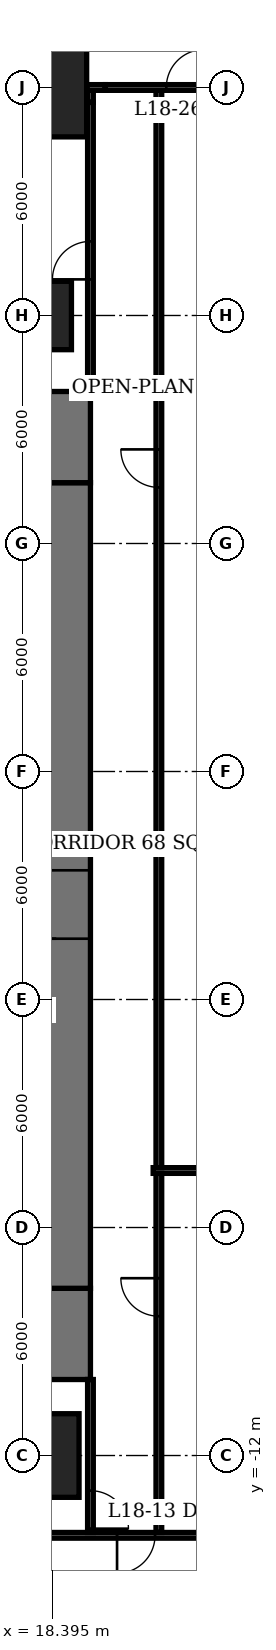
"""IFC4 building model, lengths in metres.
Left out: names, types, materials, properties, quantities, classifications, styles, units other than length and angle.
Written with IfcOpenShell. Run it as: python <this file> out.ifc"""

import sys

from ifc_helpers import new_model, si_unit, direction, frame, frame_2d, origin, origin_2d, place, context, subcontext, project, spatial, rectangle, extrude, element, fill, save


model = new_model("IFC4")
c1 = context("Model", 3, precision=1e-05, world=origin(), true_north=direction((0.0, 1.0)))
c2 = subcontext(c1, "Body", "Model", "MODEL_VIEW")
j1 = project(units=[si_unit("LENGTHUNIT", "METRE"), si_unit("PLANEANGLEUNIT", "RADIAN")], contexts=[c1])
p1 = place(None, origin())
s1 = spatial("IfcSite", under=j1, at=p1, CompositionType="ELEMENT")
p2 = place(p1, origin())
s2 = spatial("IfcBuilding", under=s1, at=p2, CompositionType="ELEMENT")
p3 = place(p2, frame((0.0, 0.0, 76.7)))
s3 = spatial("IfcBuildingStorey", under=s2, at=p3, CompositionType="ELEMENT", Elevation=76.7)
p4 = place(p3, frame((18.0, -12.0, 0.0), z_axis=(0.0, 0.0, 1.0), x_axis=(1.0, 0.0, 0.0)))
e1 = element("IfcColumn", 1, at=p4, inside=s3, PredefinedType="COLUMN", context=c2, shape_type="SweptSolid", body=[
    extrude(rectangle(XDim=2.2, YDim=2.2, at=origin_2d()), origin(), (0.0, 0.0, 1.0), 3.9),
])
p5 = place(p3, frame((18.0, 18.0, 0.0), z_axis=(0.0, 0.0, 1.0), x_axis=(1.0, 0.0, 0.0)))
e2 = element("IfcColumn", 2, at=p5, inside=s3, PredefinedType="COLUMN", context=c2, shape_type="SweptSolid", body=[
    extrude(rectangle(XDim=1.8, YDim=1.8, at=origin_2d()), origin(), (0.0, 0.0, 1.0), 3.9),
])
p6 = place(p3, frame((18.0, 24.0, 0.0), z_axis=(0.0, 0.0, 1.0), x_axis=(1.0, 0.0, 0.0)))
e3 = element("IfcColumn", 3, at=p6, inside=s3, PredefinedType="COLUMN", context=c2, shape_type="SweptSolid", body=[
    extrude(rectangle(XDim=2.6, YDim=2.6, at=origin_2d()), origin(), (0.0, 0.0, 1.0), 3.9),
])
p7 = place(p3, frame((18.5, -7.6, 0.0), z_axis=(0.0, 0.0, 1.0), x_axis=(0.0, 1.0, 0.0)))
e4 = element("IfcWall", 4, at=p7, inside=s3, PredefinedType="SHEAR", context=c2, shape_type="SweptSolid", body=[
    extrude(rectangle(XDim=21.2, YDim=1.8, at=frame_2d((10.6, 0.0))), origin(), (0.0, 0.0, 1.0), 3.9),
])
p8 = place(p7, frame((9.2, 0.0, 0.0)))
e5 = element("IfcOpeningElement", 5, at=p8, cuts=e4, PredefinedType="OPENING", context=c2, shape_type="SweptSolid", body=[
    extrude(rectangle(XDim=1.8, YDim=2.4, at=frame_2d((0.9, 1.2))), frame((0.0, 0.91, 0.0), z_axis=(0.0, -1.0, 0.0), x_axis=(1.0, 0.0, 0.0)), (0.0, 0.0, 1.0), 1.82),
])
for number, where, z_axis, x_axis in (
    (6, (18.5, -10.0, 0.0), (0.0, 0.0, 1.0), (0.0, 1.0, 0.0)),
    (7, (18.5, 13.6, 0.0), (0.0, 0.0, 1.0), (0.0, 1.0, 0.0)),
):
    element("IfcWall", number, at=place(p3, frame(where, z_axis=z_axis, x_axis=x_axis)), inside=s3, PredefinedType="SHEAR", context=c2, shape_type="SweptSolid", body=[
        extrude(rectangle(XDim=2.4, YDim=1.8, at=frame_2d((1.2, 0.0))), origin(), (0.0, 0.0, 1.0), 3.9),
    ])
p9 = place(p3, frame((23.925, -14.1, 0.0), z_axis=(0.0, 0.0, 1.0), x_axis=(-1.0, 0.0, 0.0)))
e8 = element("IfcWall", 8, at=p9, inside=s3, PredefinedType="PARTITIONING", context=c2, shape_type="SweptSolid", body=[
    extrude(rectangle(XDim=5.85, YDim=0.15, at=frame_2d((2.925, 0.0))), origin(), (0.0, 0.0, 1.0), 3.65),
])
p10 = place(p9, frame((2.825, 0.0, 0.0)))
e9 = element("IfcOpeningElement", 9, at=p10, cuts=e8, PredefinedType="OPENING", context=c2, shape_type="SweptSolid", body=[
    extrude(rectangle(XDim=1.0, YDim=2.1, at=frame_2d((0.5, 1.05))), frame((0.0, 0.085, 0.0), z_axis=(0.0, -1.0, 0.0), x_axis=(1.0, 0.0, 0.0)), (0.0, 0.0, 1.0), 0.17),
])
p11 = place(p3, frame((19.3, 24.0, 0.0), z_axis=(0.0, 0.0, 1.0), x_axis=(1.0, 0.0, 0.0)))
e10 = element("IfcWall", 10, at=p11, inside=s3, PredefinedType="PARTITIONING", context=c2, shape_type="SweptSolid", body=[
    extrude(rectangle(XDim=0.492, YDim=0.15, at=frame_2d((0.246, 0.0))), origin(), (0.0, 0.0, 1.0), 2.65),
])
p12 = place(p3, frame((19.792, 24.0, 0.0), z_axis=(0.0, 0.0, 1.0), x_axis=(1.0, 0.0, 0.0)))
e11 = element("IfcWall", 11, at=p12, inside=s3, PredefinedType="PARTITIONING", context=c2, shape_type="SweptSolid", body=[
    extrude(rectangle(XDim=4.133, YDim=0.15, at=frame_2d((2.066, 0.0))), origin(), (0.0, 0.0, 1.0), 3.65),
])
p13 = place(p12, frame((1.604, 0.0, 0.0)))
e12 = element("IfcOpeningElement", 12, at=p13, cuts=e11, PredefinedType="OPENING", context=c2, shape_type="SweptSolid", body=[
    extrude(rectangle(XDim=1.0, YDim=2.1, at=frame_2d((0.5, 1.05))), frame((0.0, 0.085, 0.0), z_axis=(0.0, -1.0, 0.0), x_axis=(1.0, 0.0, 0.0)), (0.0, 0.0, 1.0), 0.17),
])
p14 = place(p3, frame((19.4, -10.0, 0.0), z_axis=(0.0, 0.0, 1.0), x_axis=(0.0, -1.0, 0.0)))
e13 = element("IfcWall", 13, at=p14, inside=s3, PredefinedType="PARTITIONING", context=c2, shape_type="SweptSolid", body=[
    extrude(rectangle(XDim=4.025, YDim=0.15, at=frame_2d((2.012, 0.0))), origin(), (0.0, 0.0, 1.0), 3.65),
])
p15 = place(p14, frame((2.925, 0.0, 0.0)))
e14 = element("IfcOpeningElement", 14, at=p15, cuts=e13, PredefinedType="OPENING", context=c2, shape_type="SweptSolid", body=[
    extrude(rectangle(XDim=1.0, YDim=2.1, at=frame_2d((0.5, 1.05))), frame((0.0, 0.085, 0.0), z_axis=(0.0, -1.0, 0.0), x_axis=(1.0, 0.0, 0.0)), (0.0, 0.0, 1.0), 0.17),
])
p16 = place(p3, frame((19.4, 16.0, 0.0), z_axis=(0.0, 0.0, 1.0), x_axis=(0.0, 1.0, 0.0)))
e15 = element("IfcWall", 15, at=p16, inside=s3, PredefinedType="PARTITIONING", context=c2, shape_type="SweptSolid", body=[
    extrude(rectangle(XDim=7.608, YDim=0.15, at=frame_2d((3.804, 0.0))), origin(), (0.0, 0.0, 1.0), 3.65),
])
p17 = place(p16, frame((2.95, 0.0, 0.0)))
e16 = element("IfcOpeningElement", 16, at=p17, cuts=e15, PredefinedType="OPENING", context=c2, shape_type="SweptSolid", body=[
    extrude(rectangle(XDim=1.0, YDim=2.1, at=frame_2d((0.5, 1.05))), frame((0.0, 0.085, 0.0), z_axis=(0.0, -1.0, 0.0), x_axis=(1.0, 0.0, 0.0)), (0.0, 0.0, 1.0), 0.17),
])
p18 = place(p3, frame((19.4, 23.608, 0.0), z_axis=(0.0, 0.0, 1.0), x_axis=(0.0, 1.0, 0.0)))
e17 = element("IfcWall", 17, at=p18, inside=s3, PredefinedType="PARTITIONING", context=c2, shape_type="SweptSolid", body=[
    extrude(rectangle(XDim=0.317, YDim=0.15, at=frame_2d((0.159, 0.0))), origin(), (0.0, 0.0, 1.0), 2.65),
])
p19 = place(p3, frame((21.2, -14.025, 0.0), z_axis=(0.0, 0.0, 1.0), x_axis=(0.0, 1.0, 0.0)))
e18 = element("IfcWall", 18, at=p19, inside=s3, PredefinedType="PARTITIONING", context=c2, shape_type="SweptSolid", body=[
    extrude(rectangle(XDim=9.45, YDim=0.15, at=frame_2d((4.725, 0.0))), origin(), (0.0, 0.0, 1.0), 3.65),
])
p20 = place(p19, frame((5.691, 0.0, 0.0)))
e19 = element("IfcOpeningElement", 19, at=p20, cuts=e18, PredefinedType="OPENING", context=c2, shape_type="SweptSolid", body=[
    extrude(rectangle(XDim=1.0, YDim=2.1, at=frame_2d((0.5, 1.05))), frame((0.0, 0.085, 0.0), z_axis=(0.0, -1.0, 0.0), x_axis=(1.0, 0.0, 0.0)), (0.0, 0.0, 1.0), 0.17),
])
p21 = place(p3, frame((21.2, -4.425, 0.0), z_axis=(0.0, 0.0, 1.0), x_axis=(0.0, 1.0, 0.0)))
e20 = element("IfcWall", 20, at=p21, inside=s3, PredefinedType="PARTITIONING", context=c2, shape_type="SweptSolid", body=[
    extrude(rectangle(XDim=28.35, YDim=0.15, at=frame_2d((14.175, 0.0))), origin(), (0.0, 0.0, 1.0), 3.65),
])
p22 = place(p21, frame((17.901, 0.0, 0.0)))
e21 = element("IfcOpeningElement", 21, at=p22, cuts=e20, PredefinedType="OPENING", context=c2, shape_type="SweptSolid", body=[
    extrude(rectangle(XDim=1.0, YDim=2.1, at=frame_2d((0.5, 1.05))), frame((0.0, 0.085, 0.0), z_axis=(0.0, -1.0, 0.0), x_axis=(1.0, 0.0, 0.0)), (0.0, 0.0, 1.0), 0.17),
])
p23 = place(p3, frame((21.05, -4.5, 0.0), z_axis=(0.0, 0.0, 1.0), x_axis=(1.0, 0.0, 0.0)))
e22 = element("IfcWall", 22, at=p23, inside=s3, PredefinedType="PARTITIONING", context=c2, shape_type="SweptSolid", body=[
    extrude(rectangle(XDim=4.675, YDim=0.15, at=frame_2d((2.337, 0.0))), origin(), (0.0, 0.0, 1.0), 3.65),
])
p24 = place(p8, origin())
e23 = element("IfcDoor", 23, at=p24, inside=s3, OperationType="DOUBLE_DOOR_SINGLE_SWING", PredefinedType="DOOR", context=c2, shape_type="SweptSolid", body=[
    extrude(rectangle(XDim=1.8, YDim=2.4, at=frame_2d((0.9, 1.2))), frame((0.0, 0.025, 0.0), z_axis=(0.0, -1.0, 0.0), x_axis=(1.0, 0.0, 0.0)), (0.0, 0.0, 1.0), 0.05),
])
fill(e5, e23)
p25 = place(p10, origin())
e24 = element("IfcDoor", 24, at=p25, inside=s3, OperationType="SINGLE_SWING_RIGHT", PredefinedType="DOOR", context=c2, shape_type="SweptSolid", body=[
    extrude(rectangle(XDim=1.0, YDim=2.1, at=frame_2d((0.5, 1.05))), frame((0.0, 0.025, 0.0), z_axis=(0.0, -1.0, 0.0), x_axis=(1.0, 0.0, 0.0)), (0.0, 0.0, 1.0), 0.05),
])
fill(e9, e24)
p26 = place(p13, origin())
e25 = element("IfcDoor", 25, at=p26, inside=s3, OperationType="SINGLE_SWING_RIGHT", PredefinedType="DOOR", context=c2, shape_type="SweptSolid", body=[
    extrude(rectangle(XDim=1.0, YDim=2.1, at=frame_2d((0.5, 1.05))), frame((0.0, 0.025, 0.0), z_axis=(0.0, -1.0, 0.0), x_axis=(1.0, 0.0, 0.0)), (0.0, 0.0, 1.0), 0.05),
])
fill(e12, e25)
p27 = place(p20, origin())
e26 = element("IfcDoor", 26, at=p27, inside=s3, OperationType="SINGLE_SWING_RIGHT", PredefinedType="DOOR", context=c2, shape_type="SweptSolid", body=[
    extrude(rectangle(XDim=1.0, YDim=2.1, at=frame_2d((0.5, 1.05))), frame((0.0, 0.025, 0.0), z_axis=(0.0, -1.0, 0.0), x_axis=(1.0, 0.0, 0.0)), (0.0, 0.0, 1.0), 0.05),
])
fill(e19, e26)
p28 = place(p22, origin())
e27 = element("IfcDoor", 27, at=p28, inside=s3, OperationType="SINGLE_SWING_RIGHT", PredefinedType="DOOR", context=c2, shape_type="SweptSolid", body=[
    extrude(rectangle(XDim=1.0, YDim=2.1, at=frame_2d((0.5, 1.05))), frame((0.0, 0.025, 0.0), z_axis=(0.0, -1.0, 0.0), x_axis=(1.0, 0.0, 0.0)), (0.0, 0.0, 1.0), 0.05),
])
fill(e21, e27)
p29 = place(p17, origin())
e28 = element("IfcDoor", 28, at=p29, inside=s3, OperationType="SINGLE_SWING_LEFT", PredefinedType="DOOR", context=c2, shape_type="SweptSolid", body=[
    extrude(rectangle(XDim=1.0, YDim=2.1, at=frame_2d((0.5, 1.05))), frame((0.0, 0.025, 0.0), z_axis=(0.0, -1.0, 0.0), x_axis=(1.0, 0.0, 0.0)), (0.0, 0.0, 1.0), 0.05),
])
fill(e16, e28)
p30 = place(p15, origin())
e29 = element("IfcDoor", 29, at=p30, inside=s3, OperationType="SINGLE_SWING_RIGHT", PredefinedType="DOOR", context=c2, shape_type="SweptSolid", body=[
    extrude(rectangle(XDim=1.0, YDim=2.1, at=frame_2d((0.5, 1.05))), frame((0.0, 0.025, 0.0), z_axis=(0.0, -1.0, 0.0), x_axis=(1.0, 0.0, 0.0)), (0.0, 0.0, 1.0), 0.05),
])
fill(e14, e29)
save(model, sys.argv[1])
